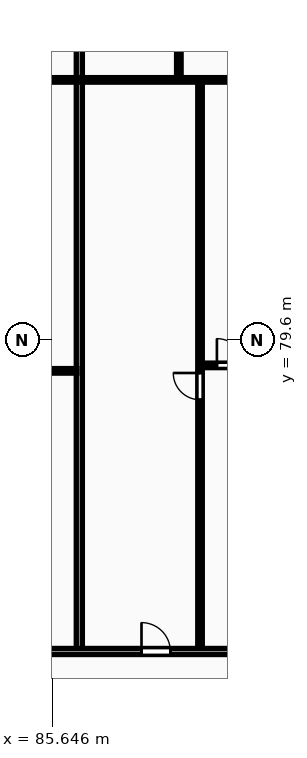
"""IFC4 building model, lengths in metres.
Left out: names, types, materials, properties, quantities, classifications, styles, units other than length and angle.
Written with IfcOpenShell. Run it as: python <this file> out.ifc"""

import sys

from ifc_helpers import new_model, si_unit, direction, frame, frame_2d, origin, place, context, subcontext, project, spatial, rectangle, extrude, element, fill, save


model = new_model("IFC4")
c1 = context("Model", 3, precision=1e-05, world=origin(), true_north=direction((0.0, 1.0)))
c2 = subcontext(c1, "Body", "Model", "MODEL_VIEW")
j1 = project(units=[si_unit("LENGTHUNIT", "METRE"), si_unit("PLANEANGLEUNIT", "RADIAN")], contexts=[c1])
p1 = place(None, origin())
s1 = spatial("IfcSite", under=j1, at=p1, CompositionType="ELEMENT")
p2 = place(p1, origin())
s2 = spatial("IfcBuilding", under=s1, at=p2, CompositionType="ELEMENT")
p3 = place(p2, frame((0.0, 0.0, 24.0)))
s3 = spatial("IfcBuildingStorey", under=s2, at=p3, CompositionType="ELEMENT", Elevation=24.0)
p4 = place(p3, frame((86.542, 69.43, 0.0), z_axis=(0.0, 0.0, 1.0), x_axis=(0.0, 1.0, 0.0)))
e1 = element("IfcWall", 1, at=p4, inside=s3, PredefinedType="PARTITIONING", context=c2, shape_type="SweptSolid", body=[
    extrude(rectangle(XDim=29.07, YDim=0.2, at=frame_2d((14.535, 0.0))), origin(), (0.0, 0.0, 1.0), 2.97),
])
p5 = place(p3, frame((80.494, 78.58, 0.0), z_axis=(0.0, 0.0, 1.0), x_axis=(1.0, 0.0, 0.0)))
e2 = element("IfcWall", 2, at=p5, inside=s3, PredefinedType="PARTITIONING", context=c2, shape_type="SweptSolid", body=[
    extrude(rectangle(XDim=5.968, YDim=0.15, at=frame_2d((2.984, 0.0))), origin(), (0.0, 0.0, 1.0), 2.97),
])
p6 = place(p5, frame((1.403, 0.0, 0.0)))
e3 = element("IfcOpeningElement", 3, at=p6, cuts=e2, PredefinedType="OPENING", context=c2, shape_type="SweptSolid", body=[
    extrude(rectangle(XDim=0.88, YDim=2.06, at=frame_2d((0.44, 1.03))), frame((0.0, 0.085, 0.0), z_axis=(0.0, -1.0, 0.0), x_axis=(1.0, 0.0, 0.0)), (0.0, 0.0, 1.0), 0.17),
])
p7 = place(p3, frame((76.544, 88.15, 0.0), z_axis=(0.0, 0.0, 1.0), x_axis=(1.0, 0.0, 0.0)))
e4 = element("IfcWall", 4, at=p7, inside=s3, PredefinedType="PARTITIONING", context=c2, shape_type="SweptSolid", body=[
    extrude(rectangle(XDim=9.918, YDim=0.15, at=frame_2d((4.959, 0.0))), origin(), (0.0, 0.0, 1.0), 2.97),
])
p8 = place(p7, frame((4.499, 0.0, 0.0)))
e5 = element("IfcOpeningElement", 5, at=p8, cuts=e4, PredefinedType="OPENING", context=c2, shape_type="SweptSolid", body=[
    extrude(rectangle(XDim=0.92, YDim=2.08, at=frame_2d((0.46, 1.04))), frame((0.0, 0.085, 0.0), z_axis=(0.0, -1.0, 0.0), x_axis=(1.0, 0.0, 0.0)), (0.0, 0.0, 1.0), 0.17),
])
p9 = place(p3, frame((90.572, 78.76, 0.0), z_axis=(0.0, 0.0, 1.0), x_axis=(1.0, 0.0, 0.0)))
e6 = element("IfcWall", 6, at=p9, inside=s3, PredefinedType="PARTITIONING", context=c2, shape_type="SweptSolid", body=[
    extrude(rectangle(XDim=7.983, YDim=0.15, at=frame_2d((3.992, 0.0))), origin(), (0.0, 0.0, 1.0), 2.97),
])
p10 = place(p9, frame((0.495, 0.0, 0.0)))
e7 = element("IfcOpeningElement", 7, at=p10, cuts=e6, PredefinedType="OPENING", context=c2, shape_type="SweptSolid", body=[
    extrude(rectangle(XDim=0.88, YDim=2.06, at=frame_2d((0.44, 1.03))), frame((0.0, 0.085, 0.0), z_axis=(0.0, -1.0, 0.0), x_axis=(1.0, 0.0, 0.0)), (0.0, 0.0, 1.0), 0.17),
])
p11 = place(p3, frame((90.511, 69.41, 0.0), z_axis=(0.0, 0.0, 1.0), x_axis=(0.0, 1.0, 0.0)))
e8 = element("IfcWall", 8, at=p11, inside=s3, PredefinedType="PARTITIONING", context=c2, shape_type="SweptSolid", body=[
    extrude(rectangle(XDim=18.7, YDim=0.15, at=frame_2d((9.35, 0.0))), origin(), (0.0, 0.0, 1.0), 2.97),
])
p12 = place(p11, frame((8.22, 0.0, 0.0)))
e9 = element("IfcOpeningElement", 9, at=p12, cuts=e8, PredefinedType="OPENING", context=c2, shape_type="SweptSolid", body=[
    extrude(rectangle(XDim=0.88, YDim=2.06, at=frame_2d((0.44, 1.03))), frame((0.0, 0.085, 0.0), z_axis=(0.0, -1.0, 0.0), x_axis=(1.0, 0.0, 0.0)), (0.0, 0.0, 1.0), 0.17),
])
p13 = place(p3, frame((89.815, 88.19, 0.0), z_axis=(0.0, 0.0, 1.0), x_axis=(0.0, 1.0, 0.0)))
e10 = element("IfcWall", 10, at=p13, inside=s3, PredefinedType="PARTITIONING", context=c2, shape_type="SweptSolid", body=[
    extrude(rectangle(XDim=5.0, YDim=0.15, at=frame_2d((2.5, 0.0))), origin(), (0.0, 0.0, 1.0), 2.97),
])
p14 = place(p13, frame((2.08, 0.0, 0.0)))
e11 = element("IfcOpeningElement", 11, at=p14, cuts=e10, PredefinedType="OPENING", context=c2, shape_type="SweptSolid", body=[
    extrude(rectangle(XDim=0.84, YDim=2.04, at=frame_2d((0.42, 1.02))), frame((0.0, 0.085, 0.0), z_axis=(0.0, -1.0, 0.0), x_axis=(1.0, 0.0, 0.0)), (0.0, 0.0, 1.0), 0.17),
])
p15 = place(p3, frame((86.622, 88.15, 0.0), z_axis=(0.0, 0.0, 1.0), x_axis=(1.0, 0.0, 0.0)))
e12 = element("IfcWall", 12, at=p15, inside=s3, PredefinedType="PARTITIONING", context=c2, shape_type="SweptSolid", body=[
    extrude(rectangle(XDim=11.933, YDim=0.15, at=frame_2d((5.967, 0.0))), origin(), (0.0, 0.0, 1.0), 2.97),
])
p16 = place(p15, frame((5.914, 0.0, 0.0)))
e13 = element("IfcOpeningElement", 13, at=p16, cuts=e12, PredefinedType="OPENING", context=c2, shape_type="SweptSolid", body=[
    extrude(rectangle(XDim=0.92, YDim=2.08, at=frame_2d((0.46, 1.04))), frame((0.0, 0.085, 0.0), z_axis=(0.0, -1.0, 0.0), x_axis=(1.0, 0.0, 0.0)), (0.0, 0.0, 1.0), 0.17),
])
p17 = place(p3, frame((55.3, 69.35, 0.0), z_axis=(0.0, 0.0, 1.0), x_axis=(1.0, 0.0, 0.0)))
e14 = element("IfcWall", 14, at=p17, inside=s3, PredefinedType="PARTITIONING", context=c2, shape_type="SweptSolid", body=[
    extrude(rectangle(XDim=77.6, YDim=0.2, at=frame_2d((38.8, 0.0))), origin(), (0.0, 0.0, 1.0), 2.97),
])
p18 = place(p17, frame((1.81, 0.0, 0.0)))
e15 = element("IfcOpeningElement", 15, at=p18, cuts=e14, PredefinedType="OPENING", context=c2, shape_type="SweptSolid", body=[
    extrude(rectangle(XDim=0.95, YDim=2.15, at=frame_2d((0.475, 1.075))), frame((0.0, 0.11, 0.0), z_axis=(0.0, -1.0, 0.0), x_axis=(1.0, 0.0, 0.0)), (0.0, 0.0, 1.0), 0.22),
])
p19 = place(p17, frame((10.448, 0.0, 0.0)))
e16 = element("IfcOpeningElement", 16, at=p19, cuts=e14, PredefinedType="OPENING", context=c2, shape_type="SweptSolid", body=[
    extrude(rectangle(XDim=0.95, YDim=2.15, at=frame_2d((0.475, 1.075))), frame((0.0, 0.11, 0.0), z_axis=(0.0, -1.0, 0.0), x_axis=(1.0, 0.0, 0.0)), (0.0, 0.0, 1.0), 0.22),
])
p20 = place(p17, frame((23.208, 0.0, 0.0)))
e17 = element("IfcOpeningElement", 17, at=p20, cuts=e14, PredefinedType="OPENING", context=c2, shape_type="SweptSolid", body=[
    extrude(rectangle(XDim=0.95, YDim=2.15, at=frame_2d((0.475, 1.075))), frame((0.0, 0.11, 0.0), z_axis=(0.0, -1.0, 0.0), x_axis=(1.0, 0.0, 0.0)), (0.0, 0.0, 1.0), 0.22),
])
p21 = place(p17, frame((33.287, 0.0, 0.0)))
e18 = element("IfcOpeningElement", 18, at=p21, cuts=e14, PredefinedType="OPENING", context=c2, shape_type="SweptSolid", body=[
    extrude(rectangle(XDim=0.95, YDim=2.15, at=frame_2d((0.475, 1.075))), frame((0.0, 0.11, 0.0), z_axis=(0.0, -1.0, 0.0), x_axis=(1.0, 0.0, 0.0)), (0.0, 0.0, 1.0), 0.22),
])
p22 = place(p17, frame((44.905, 0.0, 0.0)))
e19 = element("IfcOpeningElement", 19, at=p22, cuts=e14, PredefinedType="OPENING", context=c2, shape_type="SweptSolid", body=[
    extrude(rectangle(XDim=0.95, YDim=2.15, at=frame_2d((0.475, 1.075))), frame((0.0, 0.11, 0.0), z_axis=(0.0, -1.0, 0.0), x_axis=(1.0, 0.0, 0.0)), (0.0, 0.0, 1.0), 0.22),
])
p23 = place(p17, frame((54.119, 0.0, 0.0)))
e20 = element("IfcOpeningElement", 20, at=p23, cuts=e14, PredefinedType="OPENING", context=c2, shape_type="SweptSolid", body=[
    extrude(rectangle(XDim=0.95, YDim=2.15, at=frame_2d((0.475, 1.075))), frame((0.0, 0.11, 0.0), z_axis=(0.0, -1.0, 0.0), x_axis=(1.0, 0.0, 0.0)), (0.0, 0.0, 1.0), 0.22),
])
p24 = place(p17, frame((66.74, 0.0, 0.0)))
e21 = element("IfcOpeningElement", 21, at=p24, cuts=e14, PredefinedType="OPENING", context=c2, shape_type="SweptSolid", body=[
    extrude(rectangle(XDim=0.95, YDim=2.15, at=frame_2d((0.475, 1.075))), frame((0.0, 0.11, 0.0), z_axis=(0.0, -1.0, 0.0), x_axis=(1.0, 0.0, 0.0)), (0.0, 0.0, 1.0), 0.22),
])
p25 = place(p10, origin())
e22 = element("IfcDoor", 22, at=p25, inside=s3, OperationType="SINGLE_SWING_LEFT", PredefinedType="DOOR", context=c2, shape_type="SweptSolid", body=[
    extrude(rectangle(XDim=0.88, YDim=2.06, at=frame_2d((0.44, 1.03))), frame((0.0, 0.025, 0.0), z_axis=(0.0, -1.0, 0.0), x_axis=(1.0, 0.0, 0.0)), (0.0, 0.0, 1.0), 0.05),
])
fill(e7, e22)
p26 = place(p12, origin())
e23 = element("IfcDoor", 23, at=p26, inside=s3, OperationType="SINGLE_SWING_RIGHT", PredefinedType="DOOR", context=c2, shape_type="SweptSolid", body=[
    extrude(rectangle(XDim=0.88, YDim=2.06, at=frame_2d((0.44, 1.03))), frame((0.0, 0.025, 0.0), z_axis=(0.0, -1.0, 0.0), x_axis=(1.0, 0.0, 0.0)), (0.0, 0.0, 1.0), 0.05),
])
fill(e9, e23)
p27 = place(p21, origin())
e24 = element("IfcDoor", 24, at=p27, inside=s3, OperationType="SINGLE_SWING_LEFT", PredefinedType="DOOR", context=c2, shape_type="SweptSolid", body=[
    extrude(rectangle(XDim=0.95, YDim=2.15, at=frame_2d((0.475, 1.075))), frame((0.0, 0.025, 0.0), z_axis=(0.0, -1.0, 0.0), x_axis=(1.0, 0.0, 0.0)), (0.0, 0.0, 1.0), 0.05),
])
fill(e18, e24)
save(model, sys.argv[1])
